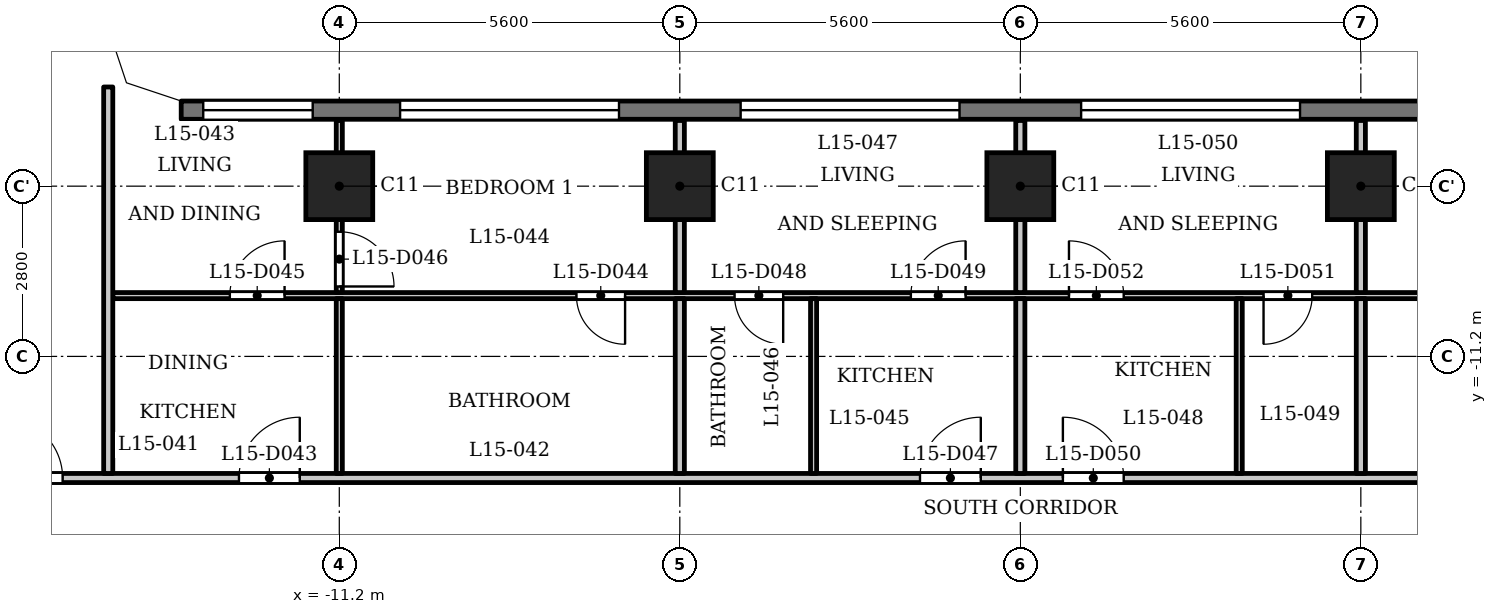
"""IFC4 building model, lengths in metres.
Left out: names, types, materials, properties, quantities, classifications, styles, units other than length and angle.
Written with IfcOpenShell. Run it as: python <this file> out.ifc"""

import sys

from ifc_helpers import new_model, si_unit, direction, frame, frame_2d, origin, origin_2d, place, context, subcontext, project, spatial, polyline, rectangle, outline, extrude, element, fill, save


model = new_model("IFC4")
c1 = context("Model", 3, precision=1e-05, world=origin(), true_north=direction((0.0, 1.0)))
c2 = subcontext(c1, "Body", "Model", "MODEL_VIEW")
j1 = project(units=[si_unit("LENGTHUNIT", "METRE"), si_unit("PLANEANGLEUNIT", "RADIAN")], contexts=[c1])
p1 = place(None, origin())
s1 = spatial("IfcSite", under=j1, at=p1, CompositionType="ELEMENT")
p2 = place(p1, origin())
s2 = spatial("IfcBuilding", under=s1, at=p2, CompositionType="ELEMENT")
p3 = place(p2, frame((0.0, 0.0, 62.0)))
s3 = spatial("IfcBuildingStorey", under=s2, at=p3, CompositionType="ELEMENT", Elevation=62.0)
for number, where, z_axis, x_axis in (
    (1, (-11.2, -8.4, 0.0), (0.0, 0.0, 1.0), (1.0, 0.0, 0.0)),
    (2, (-5.6, -8.4, 0.0), (0.0, 0.0, 1.0), (1.0, 0.0, 0.0)),
    (3, (0.0, -8.4, 0.0), (0.0, 0.0, 1.0), (1.0, 0.0, 0.0)),
    (4, (5.6, -8.4, 0.0), (0.0, 0.0, 1.0), (1.0, 0.0, 0.0)),
):
    element("IfcColumn", number, at=place(p3, frame(where, z_axis=z_axis, x_axis=x_axis)), inside=s3, PredefinedType="COLUMN", context=c2, shape_type="SweptSolid", body=[
        extrude(rectangle(XDim=1.1, YDim=1.1, at=origin_2d()), origin(), (0.0, 0.0, 1.0), 3.5),
    ])
p4 = place(p3, frame((13.8, -7.15, 0.0), z_axis=(0.0, 0.0, 1.0), x_axis=(-1.0, 0.0, 0.0)))
e5 = element("IfcWall", 5, at=p4, inside=s3, PredefinedType="SOLIDWALL", context=c2, shape_type="SweptSolid", body=[
    extrude(rectangle(XDim=27.6, YDim=0.3, at=frame_2d((13.8, 0.0))), origin(), (0.0, 0.0, 1.0), 3.2),
])
p5 = place(p4, frame((0.363, 0.0, 0.9)))
e6 = element("IfcOpeningElement", 6, at=p5, cuts=e5, PredefinedType="OPENING", context=c2, shape_type="SweptSolid", body=[
    extrude(rectangle(XDim=1.8, YDim=1.25, at=frame_2d((0.9, 0.625))), frame((0.0, 0.16, 0.0), z_axis=(0.0, -1.0, 0.0), x_axis=(1.0, 0.0, 0.0)), (0.0, 0.0, 1.0), 0.32),
])
p6 = place(p4, frame((3.6, 0.0, 1.2)))
e7 = element("IfcOpeningElement", 7, at=p6, cuts=e5, PredefinedType="OPENING", context=c2, shape_type="SweptSolid", body=[
    extrude(rectangle(XDim=3.6, YDim=0.95, at=frame_2d((1.8, 0.475))), frame((0.0, 0.16, 0.0), z_axis=(0.0, -1.0, 0.0), x_axis=(1.0, 0.0, 0.0)), (0.0, 0.0, 1.0), 0.32),
])
p7 = place(p4, frame((9.2, 0.0, 1.2)))
e8 = element("IfcOpeningElement", 8, at=p7, cuts=e5, PredefinedType="OPENING", context=c2, shape_type="SweptSolid", body=[
    extrude(rectangle(XDim=3.6, YDim=0.95, at=frame_2d((1.8, 0.475))), frame((0.0, 0.16, 0.0), z_axis=(0.0, -1.0, 0.0), x_axis=(1.0, 0.0, 0.0)), (0.0, 0.0, 1.0), 0.32),
])
p8 = place(p4, frame((14.8, 0.0, 1.2)))
e9 = element("IfcOpeningElement", 9, at=p8, cuts=e5, PredefinedType="OPENING", context=c2, shape_type="SweptSolid", body=[
    extrude(rectangle(XDim=3.6, YDim=0.95, at=frame_2d((1.8, 0.475))), frame((0.0, 0.16, 0.0), z_axis=(0.0, -1.0, 0.0), x_axis=(1.0, 0.0, 0.0)), (0.0, 0.0, 1.0), 0.32),
])
p9 = place(p4, frame((20.4, 0.0, 1.2)))
e10 = element("IfcOpeningElement", 10, at=p9, cuts=e5, PredefinedType="OPENING", context=c2, shape_type="SweptSolid", body=[
    extrude(rectangle(XDim=3.6, YDim=0.95, at=frame_2d((1.8, 0.475))), frame((0.0, 0.16, 0.0), z_axis=(0.0, -1.0, 0.0), x_axis=(1.0, 0.0, 0.0)), (0.0, 0.0, 1.0), 0.32),
])
p10 = place(p4, frame((25.438, 0.0, 0.9)))
e11 = element("IfcOpeningElement", 11, at=p10, cuts=e5, PredefinedType="OPENING", context=c2, shape_type="SweptSolid", body=[
    extrude(rectangle(XDim=1.8, YDim=1.25, at=frame_2d((0.9, 0.625))), frame((0.0, 0.16, 0.0), z_axis=(0.0, -1.0, 0.0), x_axis=(1.0, 0.0, 0.0)), (0.0, 0.0, 1.0), 0.32),
])
p11 = place(p3, frame((-17.4, -13.2, 0.0), z_axis=(0.0, 0.0, 1.0), x_axis=(1.0, 0.0, 0.0)))
e12 = element("IfcWall", 12, at=p11, inside=s3, PredefinedType="PARTITIONING", context=c2, shape_type="SweptSolid", body=[
    extrude(rectangle(XDim=34.8, YDim=0.15, at=frame_2d((17.4, 0.0))), origin(), (0.0, 0.0, 1.0), 3.2),
])
p12 = place(p11, frame((0.65, 0.0, 0.0)))
e13 = element("IfcOpeningElement", 13, at=p12, cuts=e12, PredefinedType="OPENING", context=c2, shape_type="SweptSolid", body=[
    extrude(rectangle(XDim=1.0, YDim=2.1, at=frame_2d((0.5, 1.05))), frame((0.0, 0.085, 0.0), z_axis=(0.0, -1.0, 0.0), x_axis=(1.0, 0.0, 0.0)), (0.0, 0.0, 1.0), 0.17),
])
p13 = place(p11, frame((33.05, 0.0, 0.0)))
e14 = element("IfcOpeningElement", 14, at=p13, cuts=e12, PredefinedType="OPENING", context=c2, shape_type="SweptSolid", body=[
    extrude(rectangle(XDim=1.0, YDim=2.1, at=frame_2d((0.5, 1.05))), frame((0.0, 0.085, 0.0), z_axis=(0.0, -1.0, 0.0), x_axis=(1.0, 0.0, 0.0)), (0.0, 0.0, 1.0), 0.17),
])
p14 = place(p11, frame((4.55, 0.0, 0.0)))
e15 = element("IfcOpeningElement", 15, at=p14, cuts=e12, PredefinedType="OPENING", context=c2, shape_type="SweptSolid", body=[
    extrude(rectangle(XDim=1.0, YDim=2.1, at=frame_2d((0.5, 1.05))), frame((0.0, 0.085, 0.0), z_axis=(0.0, -1.0, 0.0), x_axis=(1.0, 0.0, 0.0)), (0.0, 0.0, 1.0), 0.17),
])
p15 = place(p11, frame((15.75, 0.0, 0.0)))
e16 = element("IfcOpeningElement", 16, at=p15, cuts=e12, PredefinedType="OPENING", context=c2, shape_type="SweptSolid", body=[
    extrude(rectangle(XDim=1.0, YDim=2.1, at=frame_2d((0.5, 1.05))), frame((0.0, 0.085, 0.0), z_axis=(0.0, -1.0, 0.0), x_axis=(1.0, 0.0, 0.0)), (0.0, 0.0, 1.0), 0.17),
])
p16 = place(p11, frame((18.1, 0.0, 0.0)))
e17 = element("IfcOpeningElement", 17, at=p16, cuts=e12, PredefinedType="OPENING", context=c2, shape_type="SweptSolid", body=[
    extrude(rectangle(XDim=1.0, YDim=2.1, at=frame_2d((0.5, 1.05))), frame((0.0, 0.085, 0.0), z_axis=(0.0, -1.0, 0.0), x_axis=(1.0, 0.0, 0.0)), (0.0, 0.0, 1.0), 0.17),
])
p17 = place(p11, frame((26.95, 0.0, 0.0)))
e18 = element("IfcOpeningElement", 18, at=p17, cuts=e12, PredefinedType="OPENING", context=c2, shape_type="SweptSolid", body=[
    extrude(rectangle(XDim=1.0, YDim=2.1, at=frame_2d((0.5, 1.05))), frame((0.0, 0.085, 0.0), z_axis=(0.0, -1.0, 0.0), x_axis=(1.0, 0.0, 0.0)), (0.0, 0.0, 1.0), 0.17),
])
p18 = place(p3, frame((-14.925, -10.2, 0.0), z_axis=(0.0, 0.0, 1.0), x_axis=(1.0, 0.0, 0.0)))
e19 = element("IfcWall", 19, at=p18, inside=s3, PredefinedType="PARTITIONING", context=c2, shape_type="SweptSolid", body=[
    extrude(rectangle(XDim=29.85, YDim=0.1, at=frame_2d((14.925, 0.0))), origin(), (0.0, 0.0, 1.0), 3.2),
])
p19 = place(p18, frame((7.625, 0.0, 0.0)))
e20 = element("IfcOpeningElement", 20, at=p19, cuts=e19, PredefinedType="OPENING", context=c2, shape_type="SweptSolid", body=[
    extrude(rectangle(XDim=0.8, YDim=2.1, at=frame_2d((0.4, 1.05))), frame((0.0, 0.06, 0.0), z_axis=(0.0, -1.0, 0.0), x_axis=(1.0, 0.0, 0.0)), (0.0, 0.0, 1.0), 0.12),
])
p20 = place(p18, frame((1.925, 0.0, 0.0)))
e21 = element("IfcOpeningElement", 21, at=p20, cuts=e19, PredefinedType="OPENING", context=c2, shape_type="SweptSolid", body=[
    extrude(rectangle(XDim=0.9, YDim=2.1, at=frame_2d((0.45, 1.05))), frame((0.0, 0.06, 0.0), z_axis=(0.0, -1.0, 0.0), x_axis=(1.0, 0.0, 0.0)), (0.0, 0.0, 1.0), 0.12),
])
p21 = place(p18, frame((10.225, 0.0, 0.0)))
e22 = element("IfcOpeningElement", 22, at=p21, cuts=e19, PredefinedType="OPENING", context=c2, shape_type="SweptSolid", body=[
    extrude(rectangle(XDim=0.8, YDim=2.1, at=frame_2d((0.4, 1.05))), frame((0.0, 0.06, 0.0), z_axis=(0.0, -1.0, 0.0), x_axis=(1.0, 0.0, 0.0)), (0.0, 0.0, 1.0), 0.12),
])
p22 = place(p18, frame((13.125, 0.0, 0.0)))
e23 = element("IfcOpeningElement", 23, at=p22, cuts=e19, PredefinedType="OPENING", context=c2, shape_type="SweptSolid", body=[
    extrude(rectangle(XDim=0.9, YDim=2.1, at=frame_2d((0.45, 1.05))), frame((0.0, 0.06, 0.0), z_axis=(0.0, -1.0, 0.0), x_axis=(1.0, 0.0, 0.0)), (0.0, 0.0, 1.0), 0.12),
])
p23 = place(p18, frame((18.925, 0.0, 0.0)))
e24 = element("IfcOpeningElement", 24, at=p23, cuts=e19, PredefinedType="OPENING", context=c2, shape_type="SweptSolid", body=[
    extrude(rectangle(XDim=0.8, YDim=2.1, at=frame_2d((0.4, 1.05))), frame((0.0, 0.06, 0.0), z_axis=(0.0, -1.0, 0.0), x_axis=(1.0, 0.0, 0.0)), (0.0, 0.0, 1.0), 0.12),
])
p24 = place(p18, frame((15.725, 0.0, 0.0)))
e25 = element("IfcOpeningElement", 25, at=p24, cuts=e19, PredefinedType="OPENING", context=c2, shape_type="SweptSolid", body=[
    extrude(rectangle(XDim=0.9, YDim=2.1, at=frame_2d((0.45, 1.05))), frame((0.0, 0.06, 0.0), z_axis=(0.0, -1.0, 0.0), x_axis=(1.0, 0.0, 0.0)), (0.0, 0.0, 1.0), 0.12),
])
p25 = place(p18, frame((28.525, 0.0, 0.0)))
e26 = element("IfcOpeningElement", 26, at=p25, cuts=e19, PredefinedType="OPENING", context=c2, shape_type="SweptSolid", body=[
    extrude(rectangle(XDim=0.8, YDim=2.1, at=frame_2d((0.4, 1.05))), frame((0.0, 0.06, 0.0), z_axis=(0.0, -1.0, 0.0), x_axis=(1.0, 0.0, 0.0)), (0.0, 0.0, 1.0), 0.12),
])
p26 = place(p18, frame((24.325, 0.0, 0.0)))
e27 = element("IfcOpeningElement", 27, at=p26, cuts=e19, PredefinedType="OPENING", context=c2, shape_type="SweptSolid", body=[
    extrude(rectangle(XDim=0.9, YDim=2.1, at=frame_2d((0.45, 1.05))), frame((0.0, 0.06, 0.0), z_axis=(0.0, -1.0, 0.0), x_axis=(1.0, 0.0, 0.0)), (0.0, 0.0, 1.0), 0.12),
])
p27 = place(p3, frame((-15.0, -13.125, 0.0), z_axis=(0.0, 0.0, 1.0), x_axis=(0.0, 1.0, 0.0)))
e28 = element("IfcWall", 28, at=p27, inside=s3, PredefinedType="PARTITIONING", context=c2, shape_type="SweptSolid", body=[
    extrude(rectangle(XDim=6.356, YDim=0.15, at=frame_2d((3.178, 0.0))), origin(), (0.0, 0.0, 1.0), 3.2),
])
p28 = place(p3, frame((-11.2, -13.125, 0.0), z_axis=(0.0, 0.0, 1.0), x_axis=(0.0, 1.0, 0.0)))
e29 = element("IfcWall", 29, at=p28, inside=s3, PredefinedType="PARTITIONING", context=c2, shape_type="SweptSolid", body=[
    extrude(rectangle(XDim=2.875, YDim=0.1, at=frame_2d((1.438, 0.0))), origin(), (0.0, 0.0, 1.0), 3.2),
])
p29 = place(p3, frame((-11.2, -10.15, 0.0), z_axis=(0.0, 0.0, 1.0), x_axis=(0.0, 1.0, 0.0)))
e30 = element("IfcWall", 30, at=p29, inside=s3, PredefinedType="PARTITIONING", context=c2, shape_type="SweptSolid", body=[
    extrude(rectangle(XDim=2.83, YDim=0.1, at=frame_2d((1.415, 0.0))), origin(), (0.0, 0.0, 1.0), 3.2),
])
p30 = place(p29, frame((0.1, 0.0, 0.0)))
e31 = element("IfcOpeningElement", 31, at=p30, cuts=e30, PredefinedType="OPENING", context=c2, shape_type="SweptSolid", body=[
    extrude(rectangle(XDim=0.9, YDim=2.1, at=frame_2d((0.45, 1.05))), frame((0.0, 0.06, 0.0), z_axis=(0.0, -1.0, 0.0), x_axis=(1.0, 0.0, 0.0)), (0.0, 0.0, 1.0), 0.12),
])
p31 = place(p3, frame((-5.6, -13.125, 0.0), z_axis=(0.0, 0.0, 1.0), x_axis=(0.0, 1.0, 0.0)))
e32 = element("IfcWall", 32, at=p31, inside=s3, PredefinedType="PARTITIONING", context=c2, shape_type="SweptSolid", body=[
    extrude(rectangle(XDim=2.875, YDim=0.15, at=frame_2d((1.438, 0.0))), origin(), (0.0, 0.0, 1.0), 3.2),
])
p32 = place(p3, frame((-5.6, -10.15, 0.0), z_axis=(0.0, 0.0, 1.0), x_axis=(0.0, 1.0, 0.0)))
e33 = element("IfcWall", 33, at=p32, inside=s3, PredefinedType="PARTITIONING", context=c2, shape_type="SweptSolid", body=[
    extrude(rectangle(XDim=2.83, YDim=0.15, at=frame_2d((1.415, 0.0))), origin(), (0.0, 0.0, 1.0), 3.2),
])
p33 = place(p3, frame((-3.4, -13.125, 0.0), z_axis=(0.0, 0.0, 1.0), x_axis=(0.0, 1.0, 0.0)))
e34 = element("IfcWall", 34, at=p33, inside=s3, PredefinedType="PARTITIONING", context=c2, shape_type="SweptSolid", body=[
    extrude(rectangle(XDim=2.875, YDim=0.1, at=frame_2d((1.438, 0.0))), origin(), (0.0, 0.0, 1.0), 3.2),
])
p34 = place(p3, frame((0.0, -13.125, 0.0), z_axis=(0.0, 0.0, 1.0), x_axis=(0.0, 1.0, 0.0)))
e35 = element("IfcWall", 35, at=p34, inside=s3, PredefinedType="PARTITIONING", context=c2, shape_type="SweptSolid", body=[
    extrude(rectangle(XDim=2.875, YDim=0.15, at=frame_2d((1.438, 0.0))), origin(), (0.0, 0.0, 1.0), 3.2),
])
p35 = place(p3, frame((0.0, -10.15, 0.0), z_axis=(0.0, 0.0, 1.0), x_axis=(0.0, 1.0, 0.0)))
e36 = element("IfcWall", 36, at=p35, inside=s3, PredefinedType="PARTITIONING", context=c2, shape_type="SweptSolid", body=[
    extrude(rectangle(XDim=2.83, YDim=0.15, at=frame_2d((1.415, 0.0))), origin(), (0.0, 0.0, 1.0), 3.2),
])
p36 = place(p3, frame((3.6, -13.125, 0.0), z_axis=(0.0, 0.0, 1.0), x_axis=(0.0, 1.0, 0.0)))
e37 = element("IfcWall", 37, at=p36, inside=s3, PredefinedType="PARTITIONING", context=c2, shape_type="SweptSolid", body=[
    extrude(rectangle(XDim=2.875, YDim=0.1, at=frame_2d((1.438, 0.0))), origin(), (0.0, 0.0, 1.0), 3.2),
])
p37 = place(p3, frame((5.6, -13.125, 0.0), z_axis=(0.0, 0.0, 1.0), x_axis=(0.0, 1.0, 0.0)))
e38 = element("IfcWall", 38, at=p37, inside=s3, PredefinedType="PARTITIONING", context=c2, shape_type="SweptSolid", body=[
    extrude(rectangle(XDim=2.875, YDim=0.15, at=frame_2d((1.438, 0.0))), origin(), (0.0, 0.0, 1.0), 3.2),
])
p38 = place(p3, frame((5.6, -10.15, 0.0), z_axis=(0.0, 0.0, 1.0), x_axis=(0.0, 1.0, 0.0)))
e39 = element("IfcWall", 39, at=p38, inside=s3, PredefinedType="PARTITIONING", context=c2, shape_type="SweptSolid", body=[
    extrude(rectangle(XDim=2.83, YDim=0.15, at=frame_2d((1.415, 0.0))), origin(), (0.0, 0.0, 1.0), 3.2),
])
p39 = place(p3, origin())
e40 = element("IfcWall", 40, at=p39, inside=s3, PredefinedType="SOLIDWALL", context=c2, shape_type="SweptSolid", body=[
    extrude(outline(polyline([(-14.937, -6.937), (-13.849, -7.3), (-13.8, -7.3), (-13.8, -7.0), (-14.7, -6.7), (-15.0, -5.8), (-15.3, -5.8), (-15.3, -5.849), (-14.937, -6.937)])), origin(), (0.0, 0.0, 1.0), 3.2),
])
p40 = place(p12, origin())
e41 = element("IfcDoor", 41, at=p40, inside=s3, OperationType="SINGLE_SWING_RIGHT", PredefinedType="DOOR", context=c2, shape_type="SweptSolid", body=[
    extrude(rectangle(XDim=1.0, YDim=2.1, at=frame_2d((0.5, 1.05))), frame((0.0, 0.025, 0.0), z_axis=(0.0, -1.0, 0.0), x_axis=(1.0, 0.0, 0.0)), (0.0, 0.0, 1.0), 0.05),
])
fill(e13, e41)
p41 = place(p14, origin())
e42 = element("IfcDoor", 42, at=p41, inside=s3, OperationType="SINGLE_SWING_LEFT", PredefinedType="DOOR", context=c2, shape_type="SweptSolid", body=[
    extrude(rectangle(XDim=1.0, YDim=2.1, at=frame_2d((0.5, 1.05))), frame((0.0, 0.025, 0.0), z_axis=(0.0, -1.0, 0.0), x_axis=(1.0, 0.0, 0.0)), (0.0, 0.0, 1.0), 0.05),
])
fill(e15, e42)
p42 = place(p19, origin())
e43 = element("IfcDoor", 43, at=p42, inside=s3, OperationType="SINGLE_SWING_RIGHT", PredefinedType="DOOR", context=c2, shape_type="SweptSolid", body=[
    extrude(rectangle(XDim=0.8, YDim=2.1, at=frame_2d((0.4, 1.05))), frame((0.0, 0.025, 0.0), z_axis=(0.0, -1.0, 0.0), x_axis=(1.0, 0.0, 0.0)), (0.0, 0.0, 1.0), 0.05),
])
fill(e20, e43)
p43 = place(p20, origin())
e44 = element("IfcDoor", 44, at=p43, inside=s3, OperationType="SINGLE_SWING_LEFT", PredefinedType="DOOR", context=c2, shape_type="SweptSolid", body=[
    extrude(rectangle(XDim=0.9, YDim=2.1, at=frame_2d((0.45, 1.05))), frame((0.0, 0.025, 0.0), z_axis=(0.0, -1.0, 0.0), x_axis=(1.0, 0.0, 0.0)), (0.0, 0.0, 1.0), 0.05),
])
fill(e21, e44)
p44 = place(p30, origin())
e45 = element("IfcDoor", 45, at=p44, inside=s3, OperationType="SINGLE_SWING_LEFT", PredefinedType="DOOR", context=c2, shape_type="SweptSolid", body=[
    extrude(rectangle(XDim=0.9, YDim=2.1, at=frame_2d((0.45, 1.05))), frame((0.0, 0.025, 0.0), z_axis=(0.0, -1.0, 0.0), x_axis=(1.0, 0.0, 0.0)), (0.0, 0.0, 1.0), 0.05),
])
fill(e31, e45)
p45 = place(p15, origin())
e46 = element("IfcDoor", 46, at=p45, inside=s3, OperationType="SINGLE_SWING_LEFT", PredefinedType="DOOR", context=c2, shape_type="SweptSolid", body=[
    extrude(rectangle(XDim=1.0, YDim=2.1, at=frame_2d((0.5, 1.05))), frame((0.0, 0.025, 0.0), z_axis=(0.0, -1.0, 0.0), x_axis=(1.0, 0.0, 0.0)), (0.0, 0.0, 1.0), 0.05),
])
fill(e16, e46)
p46 = place(p21, origin())
e47 = element("IfcDoor", 47, at=p46, inside=s3, OperationType="SINGLE_SWING_RIGHT", PredefinedType="DOOR", context=c2, shape_type="SweptSolid", body=[
    extrude(rectangle(XDim=0.8, YDim=2.1, at=frame_2d((0.4, 1.05))), frame((0.0, 0.025, 0.0), z_axis=(0.0, -1.0, 0.0), x_axis=(1.0, 0.0, 0.0)), (0.0, 0.0, 1.0), 0.05),
])
fill(e22, e47)
p47 = place(p22, origin())
e48 = element("IfcDoor", 48, at=p47, inside=s3, OperationType="SINGLE_SWING_LEFT", PredefinedType="DOOR", context=c2, shape_type="SweptSolid", body=[
    extrude(rectangle(XDim=0.9, YDim=2.1, at=frame_2d((0.45, 1.05))), frame((0.0, 0.025, 0.0), z_axis=(0.0, -1.0, 0.0), x_axis=(1.0, 0.0, 0.0)), (0.0, 0.0, 1.0), 0.05),
])
fill(e23, e48)
p48 = place(p16, origin())
e49 = element("IfcDoor", 49, at=p48, inside=s3, OperationType="SINGLE_SWING_RIGHT", PredefinedType="DOOR", context=c2, shape_type="SweptSolid", body=[
    extrude(rectangle(XDim=1.0, YDim=2.1, at=frame_2d((0.5, 1.05))), frame((0.0, 0.025, 0.0), z_axis=(0.0, -1.0, 0.0), x_axis=(1.0, 0.0, 0.0)), (0.0, 0.0, 1.0), 0.05),
])
fill(e17, e49)
p49 = place(p23, origin())
e50 = element("IfcDoor", 50, at=p49, inside=s3, OperationType="SINGLE_SWING_LEFT", PredefinedType="DOOR", context=c2, shape_type="SweptSolid", body=[
    extrude(rectangle(XDim=0.8, YDim=2.1, at=frame_2d((0.4, 1.05))), frame((0.0, 0.025, 0.0), z_axis=(0.0, -1.0, 0.0), x_axis=(1.0, 0.0, 0.0)), (0.0, 0.0, 1.0), 0.05),
])
fill(e24, e50)
p50 = place(p24, origin())
e51 = element("IfcDoor", 51, at=p50, inside=s3, OperationType="SINGLE_SWING_RIGHT", PredefinedType="DOOR", context=c2, shape_type="SweptSolid", body=[
    extrude(rectangle(XDim=0.9, YDim=2.1, at=frame_2d((0.45, 1.05))), frame((0.0, 0.025, 0.0), z_axis=(0.0, -1.0, 0.0), x_axis=(1.0, 0.0, 0.0)), (0.0, 0.0, 1.0), 0.05),
])
fill(e25, e51)
p51 = place(p7, origin())
e52 = element("IfcWindow", 52, at=p51, inside=s3, PartitioningType="SINGLE_PANEL", PredefinedType="WINDOW", context=c2, shape_type="SweptSolid", body=[
    extrude(rectangle(XDim=3.6, YDim=0.95, at=frame_2d((1.8, 0.475))), frame((0.0, 0.03, 0.0), z_axis=(0.0, -1.0, 0.0), x_axis=(1.0, 0.0, 0.0)), (0.0, 0.0, 1.0), 0.06),
])
fill(e8, e52)
p52 = place(p8, origin())
e53 = element("IfcWindow", 53, at=p52, inside=s3, PartitioningType="SINGLE_PANEL", PredefinedType="WINDOW", context=c2, shape_type="SweptSolid", body=[
    extrude(rectangle(XDim=3.6, YDim=0.95, at=frame_2d((1.8, 0.475))), frame((0.0, 0.03, 0.0), z_axis=(0.0, -1.0, 0.0), x_axis=(1.0, 0.0, 0.0)), (0.0, 0.0, 1.0), 0.06),
])
fill(e9, e53)
p53 = place(p9, origin())
e54 = element("IfcWindow", 54, at=p53, inside=s3, PartitioningType="SINGLE_PANEL", PredefinedType="WINDOW", context=c2, shape_type="SweptSolid", body=[
    extrude(rectangle(XDim=3.6, YDim=0.95, at=frame_2d((1.8, 0.475))), frame((0.0, 0.03, 0.0), z_axis=(0.0, -1.0, 0.0), x_axis=(1.0, 0.0, 0.0)), (0.0, 0.0, 1.0), 0.06),
])
fill(e10, e54)
p54 = place(p10, origin())
e55 = element("IfcWindow", 55, at=p54, inside=s3, PartitioningType="SINGLE_PANEL", PredefinedType="WINDOW", context=c2, shape_type="SweptSolid", body=[
    extrude(rectangle(XDim=1.8, YDim=1.25, at=frame_2d((0.9, 0.625))), frame((0.0, 0.03, 0.0), z_axis=(0.0, -1.0, 0.0), x_axis=(1.0, 0.0, 0.0)), (0.0, 0.0, 1.0), 0.06),
])
fill(e11, e55)
save(model, sys.argv[1])
